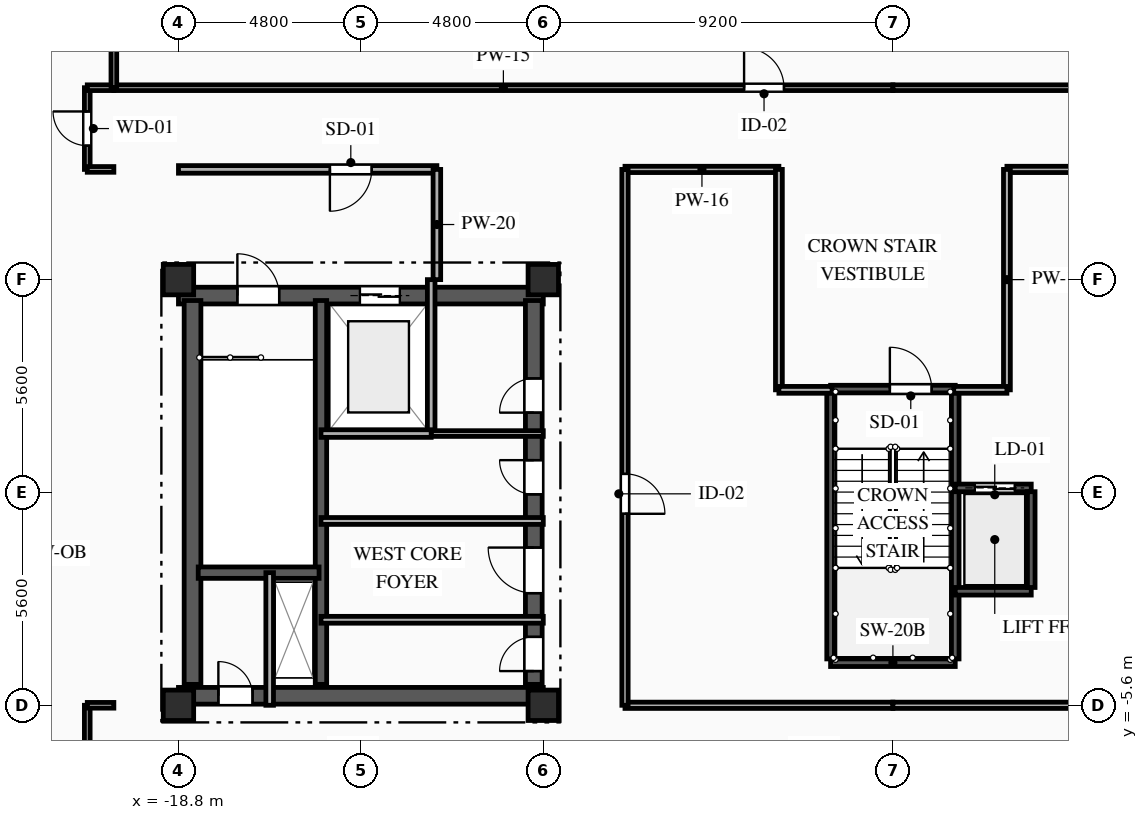
"""IFC4 building model, lengths in metres.
Left out: names, types, materials, properties, quantities, classifications, styles, units other than length and angle.
Written with IfcOpenShell. Run it as: python <this file> out.ifc"""

import sys

from ifc_helpers import new_model, si_unit, direction, frame, frame_2d, origin, origin_2d, place, context, subcontext, project, spatial, rectangle, extrude, element, fill, save


model = new_model("IFC4")
c1 = context("Model", 3, precision=1e-05, world=origin(), true_north=direction((0.0, 1.0)))
c2 = subcontext(c1, "Body", "Model", "MODEL_VIEW")
j1 = project(units=[si_unit("LENGTHUNIT", "METRE"), si_unit("PLANEANGLEUNIT", "RADIAN")], contexts=[c1])
p1 = place(None, origin())
s1 = spatial("IfcSite", under=j1, at=p1, CompositionType="ELEMENT")
p2 = place(p1, origin())
s2 = spatial("IfcBuilding", under=s1, at=p2, CompositionType="ELEMENT")
p3 = place(p2, frame((0.0, 0.0, 266.0)))
s3 = spatial("IfcBuildingStorey", under=s2, at=p3, CompositionType="ELEMENT", Elevation=266.0)
for number, where, z_axis, x_axis in (
    (1, (-18.8, -5.6, 0.0), (0.0, 0.0, 1.0), (1.0, 0.0, 0.0)),
    (2, (-18.8, 5.6, 0.0), (0.0, 0.0, 1.0), (1.0, 0.0, 0.0)),
    (3, (-9.2, -5.6, 0.0), (0.0, 0.0, 1.0), (1.0, 0.0, 0.0)),
    (4, (-9.2, 5.6, 0.0), (0.0, 0.0, 1.0), (1.0, 0.0, 0.0)),
):
    element("IfcColumn", number, at=place(p3, frame(where, z_axis=z_axis, x_axis=x_axis)), inside=s3, PredefinedType="COLUMN", context=c2, shape_type="SweptSolid", body=[
        extrude(rectangle(XDim=0.8, YDim=0.8, at=origin_2d()), origin(), (0.0, 0.0, 1.0), 4.2),
    ])
p4 = place(p3, frame((-18.8, 5.18, 0.0), z_axis=(0.0, 0.0, 1.0), x_axis=(1.0, 0.0, 0.0)))
e5 = element("IfcWall", 5, at=p4, inside=s3, PredefinedType="SHEAR", context=c2, shape_type="SweptSolid", body=[
    extrude(rectangle(XDim=9.6, YDim=0.44, at=frame_2d((4.8, 0.0))), origin(), (0.0, 0.0, 1.0), 3.8),
])
p5 = place(p4, frame((1.55, 0.0, 0.0)))
e6 = element("IfcOpeningElement", 6, at=p5, cuts=e5, PredefinedType="OPENING", context=c2, shape_type="SweptSolid", body=[
    extrude(rectangle(XDim=1.1, YDim=2.15, at=frame_2d((0.55, 1.075))), frame((0.0, 0.23, 0.0), z_axis=(0.0, -1.0, 0.0), x_axis=(1.0, 0.0, 0.0)), (0.0, 0.0, 1.0), 0.46),
])
p6 = place(p4, frame((4.775, 0.0, 0.0)))
e7 = element("IfcOpeningElement", 7, at=p6, cuts=e5, PredefinedType="OPENING", context=c2, shape_type="SweptSolid", body=[
    extrude(rectangle(XDim=1.05, YDim=2.1, at=frame_2d((0.525, 1.05))), frame((0.0, 0.23, 0.0), z_axis=(0.0, -1.0, 0.0), x_axis=(1.0, 0.0, 0.0)), (0.0, 0.0, 1.0), 0.46),
])
p7 = place(p3, frame((-18.8, -5.35, 0.0), z_axis=(0.0, 0.0, 1.0), x_axis=(1.0, 0.0, 0.0)))
e8 = element("IfcWall", 8, at=p7, inside=s3, PredefinedType="SHEAR", context=c2, shape_type="SweptSolid", body=[
    extrude(rectangle(XDim=9.6, YDim=0.44, at=frame_2d((4.8, 0.0))), origin(), (0.0, 0.0, 1.0), 3.8),
])
p8 = place(p7, frame((1.05, 0.0, 0.0)))
e9 = element("IfcOpeningElement", 9, at=p8, cuts=e8, PredefinedType="OPENING", context=c2, shape_type="SweptSolid", body=[
    extrude(rectangle(XDim=0.9, YDim=2.1, at=frame_2d((0.45, 1.05))), frame((0.0, 0.23, 0.0), z_axis=(0.0, -1.0, 0.0), x_axis=(1.0, 0.0, 0.0)), (0.0, 0.0, 1.0), 0.46),
])
p9 = place(p3, frame((-18.43, -5.05, 0.0), z_axis=(0.0, 0.0, 1.0), x_axis=(0.0, 1.0, 0.0)))
e10 = element("IfcWall", 10, at=p9, inside=s3, PredefinedType="SHEAR", context=c2, shape_type="SweptSolid", body=[
    extrude(rectangle(XDim=10.1, YDim=0.44, at=frame_2d((5.05, 0.0))), origin(), (0.0, 0.0, 1.0), 3.8),
])
p10 = place(p3, frame((-9.45, -5.05, 0.0), z_axis=(0.0, 0.0, 1.0), x_axis=(0.0, 1.0, 0.0)))
e11 = element("IfcWall", 11, at=p10, inside=s3, PredefinedType="SHEAR", context=c2, shape_type="SweptSolid", body=[
    extrude(rectangle(XDim=10.1, YDim=0.44, at=frame_2d((5.05, 0.0))), origin(), (0.0, 0.0, 1.0), 3.8),
])
p11 = place(p10, frame((7.15, 0.0, 0.0)))
e12 = element("IfcOpeningElement", 12, at=p11, cuts=e11, PredefinedType="OPENING", context=c2, shape_type="SweptSolid", body=[
    extrude(rectangle(XDim=0.9, YDim=2.1, at=frame_2d((0.45, 1.05))), frame((0.0, 0.23, 0.0), z_axis=(0.0, -1.0, 0.0), x_axis=(1.0, 0.0, 0.0)), (0.0, 0.0, 1.0), 0.46),
])
p12 = place(p10, frame((2.4, 0.0, 0.0)))
e13 = element("IfcOpeningElement", 13, at=p12, cuts=e11, PredefinedType="OPENING", context=c2, shape_type="SweptSolid", body=[
    extrude(rectangle(XDim=1.2, YDim=2.15, at=frame_2d((0.6, 1.075))), frame((0.0, 0.23, 0.0), z_axis=(0.0, -1.0, 0.0), x_axis=(1.0, 0.0, 0.0)), (0.0, 0.0, 1.0), 0.46),
])
p13 = place(p10, frame((0.35, 0.0, 0.0)))
e14 = element("IfcOpeningElement", 14, at=p13, cuts=e11, PredefinedType="OPENING", context=c2, shape_type="SweptSolid", body=[
    extrude(rectangle(XDim=0.9, YDim=2.1, at=frame_2d((0.45, 1.05))), frame((0.0, 0.23, 0.0), z_axis=(0.0, -1.0, 0.0), x_axis=(1.0, 0.0, 0.0)), (0.0, 0.0, 1.0), 0.46),
])
p14 = place(p10, frame((5.0, 0.0, 0.0)))
e15 = element("IfcOpeningElement", 15, at=p14, cuts=e11, PredefinedType="OPENING", context=c2, shape_type="SweptSolid", body=[
    extrude(rectangle(XDim=0.9, YDim=2.1, at=frame_2d((0.45, 1.05))), frame((0.0, 0.23, 0.0), z_axis=(0.0, -1.0, 0.0), x_axis=(1.0, 0.0, 0.0)), (0.0, 0.0, 1.0), 0.46),
])
p15 = place(p3, frame((-15.05, -5.05, 0.0), z_axis=(0.0, 0.0, 1.0), x_axis=(0.0, 1.0, 0.0)))
e16 = element("IfcWall", 16, at=p15, inside=s3, PredefinedType="SHEAR", context=c2, shape_type="SweptSolid", body=[
    extrude(rectangle(XDim=10.1, YDim=0.3, at=frame_2d((5.05, 0.0))), origin(), (0.0, 0.0, 1.0), 3.8),
])
p16 = place(p3, frame((-18.28, -2.11, 0.0), z_axis=(0.0, 0.0, 1.0), x_axis=(1.0, 0.0, 0.0)))
e17 = element("IfcWall", 17, at=p16, inside=s3, PredefinedType="SHEAR", context=c2, shape_type="SweptSolid", body=[
    extrude(rectangle(XDim=3.18, YDim=0.3, at=frame_2d((1.59, 0.0))), origin(), (0.0, 0.0, 1.0), 3.8),
])
p17 = place(p3, frame((-1.64, 2.72, 0.0), z_axis=(0.0, 0.0, 1.0), x_axis=(1.0, 0.0, 0.0)))
e18 = element("IfcWall", 18, at=p17, inside=s3, PredefinedType="SHEAR", context=c2, shape_type="SweptSolid", body=[
    extrude(rectangle(XDim=3.28, YDim=0.2, at=frame_2d((1.64, 0.0))), origin(), (0.0, 0.0, 1.0), 3.8),
])
p18 = place(p17, frame((1.56, 0.0, 0.0)))
e19 = element("IfcOpeningElement", 19, at=p18, cuts=e18, PredefinedType="OPENING", context=c2, shape_type="SweptSolid", body=[
    extrude(rectangle(XDim=1.1, YDim=2.15, at=frame_2d((0.55, 1.075))), frame((0.0, 0.11, 0.0), z_axis=(0.0, -1.0, 0.0), x_axis=(1.0, 0.0, 0.0)), (0.0, 0.0, 1.0), 0.22),
])
p19 = place(p3, frame((-1.64, -4.48, 0.0), z_axis=(0.0, 0.0, 1.0), x_axis=(1.0, 0.0, 0.0)))
e20 = element("IfcWall", 20, at=p19, inside=s3, PredefinedType="SHEAR", context=c2, shape_type="SweptSolid", body=[
    extrude(rectangle(XDim=3.28, YDim=0.2, at=frame_2d((1.64, 0.0))), origin(), (0.0, 0.0, 1.0), 3.8),
])
for number, where, z_axis, x_axis in (
    (21, (-1.64, -4.38, 0.0), (0.0, 0.0, 1.0), (0.0, 1.0, 0.0)),
    (22, (1.64, -4.38, 0.0), (0.0, 0.0, 1.0), (0.0, 1.0, 0.0)),
):
    element("IfcWall", number, at=place(p3, frame(where, z_axis=z_axis, x_axis=x_axis)), inside=s3, PredefinedType="SHEAR", context=c2, shape_type="SweptSolid", body=[
        extrude(rectangle(XDim=7.0, YDim=0.2, at=frame_2d((3.5, 0.0))), origin(), (0.0, 0.0, 1.0), 3.8),
    ])
p20 = place(p3, frame((1.64, 0.12, 0.0), z_axis=(0.0, 0.0, 1.0), x_axis=(1.0, 0.0, 0.0)))
e23 = element("IfcWall", 23, at=p20, inside=s3, PredefinedType="SHEAR", context=c2, shape_type="SweptSolid", body=[
    extrude(rectangle(XDim=2.0, YDim=0.2, at=frame_2d((1.0, 0.0))), origin(), (0.0, 0.0, 1.0), 3.8),
])
p21 = place(p20, frame((0.515, 0.0, 0.0)))
e24 = element("IfcOpeningElement", 24, at=p21, cuts=e23, PredefinedType="OPENING", context=c2, shape_type="SweptSolid", body=[
    extrude(rectangle(XDim=1.05, YDim=2.1, at=frame_2d((0.525, 1.05))), frame((0.0, 0.11, 0.0), z_axis=(0.0, -1.0, 0.0), x_axis=(1.0, 0.0, 0.0)), (0.0, 0.0, 1.0), 0.22),
])
p22 = place(p3, frame((1.64, -2.6, 0.0), z_axis=(0.0, 0.0, 1.0), x_axis=(1.0, 0.0, 0.0)))
e25 = element("IfcWall", 25, at=p22, inside=s3, PredefinedType="SHEAR", context=c2, shape_type="SweptSolid", body=[
    extrude(rectangle(XDim=2.0, YDim=0.2, at=frame_2d((1.0, 0.0))), origin(), (0.0, 0.0, 1.0), 3.8),
])
p23 = place(p3, frame((3.64, -2.5, 0.0), z_axis=(0.0, 0.0, 1.0), x_axis=(0.0, 1.0, 0.0)))
e26 = element("IfcWall", 26, at=p23, inside=s3, PredefinedType="SHEAR", context=c2, shape_type="SweptSolid", body=[
    extrude(rectangle(XDim=2.52, YDim=0.2, at=frame_2d((1.26, 0.0))), origin(), (0.0, 0.0, 1.0), 3.8),
])
p24 = place(p3, frame((-16.4, -5.6, 0.0), z_axis=(0.0, 0.0, 1.0), x_axis=(0.0, 1.0, 0.0)))
e27 = element("IfcWall", 27, at=p24, inside=s3, PredefinedType="PARTITIONING", context=c2, shape_type="SweptSolid", body=[
    extrude(rectangle(XDim=3.49, YDim=0.2, at=frame_2d((1.745, 0.0))), origin(), (0.0, 0.0, 1.0), 3.8),
])
p25 = place(p3, frame((-12.15, 1.55, 0.0), z_axis=(0.0, 0.0, 1.0), x_axis=(0.0, 1.0, 0.0)))
e28 = element("IfcWall", 28, at=p25, inside=s3, PredefinedType="PARTITIONING", context=c2, shape_type="SweptSolid", body=[
    extrude(rectangle(XDim=4.05, YDim=0.2, at=frame_2d((2.025, 0.0))), origin(), (0.0, 0.0, 1.0), 3.8),
])
p26 = place(p3, frame((-12.0, 8.5, 0.0), z_axis=(0.0, 0.0, 1.0), x_axis=(-1.0, 0.0, 0.0)))
e29 = element("IfcWall", 29, at=p26, inside=s3, PredefinedType="PARTITIONING", context=c2, shape_type="SweptSolid", body=[
    extrude(rectangle(XDim=6.8, YDim=0.2, at=frame_2d((3.4, 0.0))), origin(), (0.0, 0.0, 1.0), 3.8),
])
p27 = place(p26, frame((1.715, 0.0, 0.0)))
e30 = element("IfcOpeningElement", 30, at=p27, cuts=e29, PredefinedType="OPENING", context=c2, shape_type="SweptSolid", body=[
    extrude(rectangle(XDim=1.1, YDim=2.15, at=frame_2d((0.55, 1.075))), frame((0.0, 0.11, 0.0), z_axis=(0.0, -1.0, 0.0), x_axis=(1.0, 0.0, 0.0)), (0.0, 0.0, 1.0), 0.22),
])
p28 = place(p3, frame((-12.0, 5.6, 0.0), z_axis=(0.0, 0.0, 1.0), x_axis=(0.0, 1.0, 0.0)))
e31 = element("IfcWall", 31, at=p28, inside=s3, PredefinedType="PARTITIONING", context=c2, shape_type="SweptSolid", body=[
    extrude(rectangle(XDim=2.9, YDim=0.2, at=frame_2d((1.45, 0.0))), origin(), (0.0, 0.0, 1.0), 3.8),
])
p29 = place(p3, frame((-12.15, 1.55, 0.0), z_axis=(0.0, 0.0, 1.0), x_axis=(1.0, 0.0, 0.0)))
e32 = element("IfcWall", 32, at=p29, inside=s3, PredefinedType="PARTITIONING", context=c2, shape_type="SweptSolid", body=[
    extrude(rectangle(XDim=2.95, YDim=0.15, at=frame_2d((1.475, 0.0))), origin(), (0.0, 0.0, 1.0), 3.8),
])
for number, where, z_axis, x_axis in (
    (33, (-15.05, -3.35, 0.0), (0.0, 0.0, 1.0), (1.0, 0.0, 0.0)),
    (34, (-9.2, -0.75, 0.0), (0.0, 0.0, 1.0), (-1.0, 0.0, 0.0)),
):
    element("IfcWall", number, at=place(p3, frame(where, z_axis=z_axis, x_axis=x_axis)), inside=s3, PredefinedType="PARTITIONING", context=c2, shape_type="SweptSolid", body=[
        extrude(rectangle(XDim=5.85, YDim=0.18, at=frame_2d((2.925, 0.0))), origin(), (0.0, 0.0, 1.0), 3.8),
    ])
p30 = place(p3, frame((-3.0, 8.5, 0.0), z_axis=(0.0, 0.0, 1.0), x_axis=(-1.0, 0.0, 0.0)))
e35 = element("IfcWall", 35, at=p30, inside=s3, PredefinedType="PARTITIONING", context=c2, shape_type="SweptSolid", body=[
    extrude(rectangle(XDim=4.05, YDim=0.165, at=frame_2d((2.025, 0.0))), origin(), (0.0, 0.0, 1.0), 3.8),
])
p31 = place(p3, frame((-21.2, 8.5, 0.0), z_axis=(0.0, 0.0, 1.0), x_axis=(0.0, 1.0, 0.0)))
e36 = element("IfcWall", 36, at=p31, inside=s3, PredefinedType="PARTITIONING", context=c2, shape_type="SweptSolid", body=[
    extrude(rectangle(XDim=2.15, YDim=0.15, at=frame_2d((1.075, 0.0))), origin(), (0.0, 0.0, 1.0), 3.455),
])
p32 = place(p31, frame((0.625, 0.0, 0.0)))
e37 = element("IfcOpeningElement", 37, at=p32, cuts=e36, PredefinedType="OPENING", context=c2, shape_type="SweptSolid", body=[
    extrude(rectangle(XDim=0.9, YDim=2.1, at=frame_2d((0.45, 1.05))), frame((0.0, 0.085, 0.0), z_axis=(0.0, -1.0, 0.0), x_axis=(1.0, 0.0, 0.0)), (0.0, 0.0, 1.0), 0.17),
])
for number, where, z_axis, x_axis in (
    (38, (-20.5, 8.5, 0.0), (0.0, 0.0, 1.0), (-1.0, 0.0, 0.0)),
    (39, (-21.2, 10.65, 0.0), (0.0, 0.0, 1.0), (1.0, 0.0, 0.0)),
):
    element("IfcWall", number, at=place(p3, frame(where, z_axis=z_axis, x_axis=x_axis)), inside=s3, PredefinedType="PARTITIONING", context=c2, shape_type="SweptSolid", body=[
        extrude(rectangle(XDim=0.7, YDim=0.15, at=frame_2d((0.35, 0.0))), origin(), (0.0, 0.0, 1.0), 3.8),
    ])
p33 = place(p3, frame((-20.5, 10.65, 0.0), z_axis=(0.0, 0.0, 1.0), x_axis=(1.0, 0.0, 0.0)))
e40 = element("IfcWall", 40, at=p33, inside=s3, PredefinedType="PARTITIONING", context=c2, shape_type="SweptSolid", body=[
    extrude(rectangle(XDim=20.5, YDim=0.15, at=frame_2d((10.25, 0.0))), origin(), (0.0, 0.0, 1.0), 3.8),
])
p34 = place(p33, frame((16.584, 0.0, 0.0)))
e41 = element("IfcOpeningElement", 41, at=p34, cuts=e40, PredefinedType="OPENING", context=c2, shape_type="SweptSolid", body=[
    extrude(rectangle(XDim=1.05, YDim=2.15, at=frame_2d((0.525, 1.075))), frame((0.0, 0.085, 0.0), z_axis=(0.0, -1.0, 0.0), x_axis=(1.0, 0.0, 0.0)), (0.0, 0.0, 1.0), 0.17),
])
p35 = place(p3, frame((7.05, 8.5, 0.0), z_axis=(0.0, 0.0, 1.0), x_axis=(-1.0, 0.0, 0.0)))
e42 = element("IfcWall", 42, at=p35, inside=s3, PredefinedType="PARTITIONING", context=c2, shape_type="SweptSolid", body=[
    extrude(rectangle(XDim=4.05, YDim=0.165, at=frame_2d((2.025, 0.0))), origin(), (0.0, 0.0, 1.0), 3.8),
])
p36 = place(p3, frame((0.0, 10.65, 0.0), z_axis=(0.0, 0.0, 1.0), x_axis=(1.0, 0.0, 0.0)))
e43 = element("IfcWall", 43, at=p36, inside=s3, PredefinedType="PARTITIONING", context=c2, shape_type="SweptSolid", body=[
    extrude(rectangle(XDim=8.0, YDim=0.15, at=frame_2d((4.0, 0.0))), origin(), (0.0, 0.0, 1.0), 3.8),
])
p37 = place(p3, frame((-7.05, -5.6, 0.0), z_axis=(0.0, 0.0, 1.0), x_axis=(1.0, 0.0, 0.0)))
e44 = element("IfcWall", 44, at=p37, inside=s3, PredefinedType="PARTITIONING", context=c2, shape_type="SweptSolid", body=[
    extrude(rectangle(XDim=7.05, YDim=0.165, at=frame_2d((3.525, 0.0))), origin(), (0.0, 0.0, 1.0), 3.285),
])
p38 = place(p3, frame((-21.2, -7.75, 0.0), z_axis=(0.0, 0.0, 1.0), x_axis=(0.0, 1.0, 0.0)))
e45 = element("IfcWall", 45, at=p38, inside=s3, PredefinedType="PARTITIONING", context=c2, shape_type="SweptSolid", body=[
    extrude(rectangle(XDim=2.15, YDim=0.15, at=frame_2d((1.075, 0.0))), origin(), (0.0, 0.0, 1.0), 3.455),
])
p39 = place(p3, frame((-21.2, -5.6, 0.0), z_axis=(0.0, 0.0, 1.0), x_axis=(1.0, 0.0, 0.0)))
e46 = element("IfcWall", 46, at=p39, inside=s3, PredefinedType="PARTITIONING", context=c2, shape_type="SweptSolid", body=[
    extrude(rectangle(XDim=0.7, YDim=0.15, at=frame_2d((0.35, 0.0))), origin(), (0.0, 0.0, 1.0), 3.8),
])
p40 = place(p3, frame((0.0, -5.6, 0.0), z_axis=(0.0, 0.0, 1.0), x_axis=(1.0, 0.0, 0.0)))
e47 = element("IfcWall", 47, at=p40, inside=s3, PredefinedType="PARTITIONING", context=c2, shape_type="SweptSolid", body=[
    extrude(rectangle(XDim=7.05, YDim=0.165, at=frame_2d((3.525, 0.0))), origin(), (0.0, 0.0, 1.0), 3.285),
])
p41 = place(p3, frame((-7.05, 8.5, 0.0), z_axis=(0.0, 0.0, 1.0), x_axis=(0.0, -1.0, 0.0)))
e48 = element("IfcWall", 48, at=p41, inside=s3, PredefinedType="PARTITIONING", context=c2, shape_type="SweptSolid", body=[
    extrude(rectangle(XDim=14.1, YDim=0.165, at=frame_2d((7.05, 0.0))), origin(), (0.0, 0.0, 1.0), 3.8),
])
p42 = place(p41, frame((8.011, 0.0, 0.0)))
e49 = element("IfcOpeningElement", 49, at=p42, cuts=e48, PredefinedType="OPENING", context=c2, shape_type="SweptSolid", body=[
    extrude(rectangle(XDim=1.05, YDim=2.15, at=frame_2d((0.525, 1.075))), frame((0.0, 0.093, 0.0), z_axis=(0.0, -1.0, 0.0), x_axis=(1.0, 0.0, 0.0)), (0.0, 0.0, 1.0), 0.185),
])
for number, where, z_axis, x_axis in (
    (50, (3.0, 8.5, 0.0), (0.0, 0.0, 1.0), (0.0, -1.0, 0.0)),
    (51, (-3.0, 2.7, 0.0), (0.0, 0.0, 1.0), (0.0, 1.0, 0.0)),
):
    element("IfcWall", number, at=place(p3, frame(where, z_axis=z_axis, x_axis=x_axis)), inside=s3, PredefinedType="PARTITIONING", context=c2, shape_type="SweptSolid", body=[
        extrude(rectangle(XDim=5.8, YDim=0.18, at=frame_2d((2.9, 0.0))), origin(), (0.0, 0.0, 1.0), 3.8),
    ])
for number, where, z_axis, x_axis in (
    (52, (3.0, 2.7, 0.0), (0.0, 0.0, 1.0), (-1.0, 0.0, 0.0)),
    (53, (-1.6, 2.7, 0.0), (0.0, 0.0, 1.0), (-1.0, 0.0, 0.0)),
):
    element("IfcWall", number, at=place(p3, frame(where, z_axis=z_axis, x_axis=x_axis)), inside=s3, PredefinedType="PARTITIONING", context=c2, shape_type="SweptSolid", body=[
        extrude(rectangle(XDim=1.4, YDim=0.18, at=frame_2d((0.7, 0.0))), origin(), (0.0, 0.0, 1.0), 3.8),
    ])
p43 = place(p3, frame((-20.5, 15.2, 0.0), z_axis=(0.0, 0.0, 1.0), x_axis=(0.0, -1.0, 0.0)))
e54 = element("IfcWall", 54, at=p43, inside=s3, PredefinedType="PARTITIONING", context=c2, shape_type="SweptSolid", body=[
    extrude(rectangle(XDim=4.55, YDim=0.15, at=frame_2d((2.275, 0.0))), origin(), (0.0, 0.0, 1.0), 3.425),
])
p44 = place(p3, frame((-15.05, 1.55, 0.0), z_axis=(0.0, 0.0, 1.0), x_axis=(1.0, 0.0, 0.0)))
e55 = element("IfcWall", 55, at=p44, inside=s3, PredefinedType="PARTITIONING", context=c2, shape_type="SweptSolid", body=[
    extrude(rectangle(XDim=2.9, YDim=0.2, at=frame_2d((1.45, 0.0))), origin(), (0.0, 0.0, 1.0), 3.8),
])
p45 = place(p5, origin())
e56 = element("IfcDoor", 56, at=p45, inside=s3, OperationType="SINGLE_SWING_LEFT", PredefinedType="DOOR", context=c2, shape_type="SweptSolid", body=[
    extrude(rectangle(XDim=1.1, YDim=2.15, at=frame_2d((0.55, 1.075))), frame((0.0, 0.025, 0.0), z_axis=(0.0, -1.0, 0.0), x_axis=(1.0, 0.0, 0.0)), (0.0, 0.0, 1.0), 0.05),
])
fill(e6, e56)
p46 = place(p6, origin())
e57 = element("IfcDoor", 57, at=p46, inside=s3, OperationType="DOUBLE_DOOR_SLIDING", PredefinedType="DOOR", context=c2, shape_type="SweptSolid", body=[
    extrude(rectangle(XDim=1.05, YDim=2.1, at=frame_2d((0.525, 1.05))), frame((0.0, 0.025, 0.0), z_axis=(0.0, -1.0, 0.0), x_axis=(1.0, 0.0, 0.0)), (0.0, 0.0, 1.0), 0.05),
])
fill(e7, e57)
p47 = place(p8, origin())
e58 = element("IfcDoor", 58, at=p47, inside=s3, OperationType="SINGLE_SWING_LEFT", PredefinedType="DOOR", context=c2, shape_type="SweptSolid", body=[
    extrude(rectangle(XDim=0.9, YDim=2.1, at=frame_2d((0.45, 1.05))), frame((0.0, 0.025, 0.0), z_axis=(0.0, -1.0, 0.0), x_axis=(1.0, 0.0, 0.0)), (0.0, 0.0, 1.0), 0.05),
])
fill(e9, e58)
p48 = place(p18, origin())
e59 = element("IfcDoor", 59, at=p48, inside=s3, OperationType="SINGLE_SWING_LEFT", PredefinedType="DOOR", context=c2, shape_type="SweptSolid", body=[
    extrude(rectangle(XDim=1.1, YDim=2.15, at=frame_2d((0.55, 1.075))), frame((0.0, 0.025, 0.0), z_axis=(0.0, -1.0, 0.0), x_axis=(1.0, 0.0, 0.0)), (0.0, 0.0, 1.0), 0.05),
])
fill(e19, e59)
p49 = place(p21, origin())
e60 = element("IfcDoor", 60, at=p49, inside=s3, OperationType="DOUBLE_DOOR_SLIDING", PredefinedType="DOOR", context=c2, shape_type="SweptSolid", body=[
    extrude(rectangle(XDim=1.05, YDim=2.1, at=frame_2d((0.525, 1.05))), frame((0.0, 0.025, 0.0), z_axis=(0.0, -1.0, 0.0), x_axis=(1.0, 0.0, 0.0)), (0.0, 0.0, 1.0), 0.05),
])
fill(e24, e60)
p50 = place(p27, origin())
e61 = element("IfcDoor", 61, at=p50, inside=s3, OperationType="SINGLE_SWING_RIGHT", PredefinedType="DOOR", context=c2, shape_type="SweptSolid", body=[
    extrude(rectangle(XDim=1.1, YDim=2.15, at=frame_2d((0.55, 1.075))), frame((0.0, 0.025, 0.0), z_axis=(0.0, -1.0, 0.0), x_axis=(1.0, 0.0, 0.0)), (0.0, 0.0, 1.0), 0.05),
])
fill(e30, e61)
p51 = place(p11, origin())
e62 = element("IfcDoor", 62, at=p51, inside=s3, OperationType="SINGLE_SWING_LEFT", PredefinedType="DOOR", context=c2, shape_type="SweptSolid", body=[
    extrude(rectangle(XDim=0.9, YDim=2.1, at=frame_2d((0.45, 1.05))), frame((0.0, 0.025, 0.0), z_axis=(0.0, -1.0, 0.0), x_axis=(1.0, 0.0, 0.0)), (0.0, 0.0, 1.0), 0.05),
])
fill(e12, e62)
p52 = place(p12, origin())
e63 = element("IfcDoor", 63, at=p52, inside=s3, OperationType="SINGLE_SWING_RIGHT", PredefinedType="DOOR", context=c2, shape_type="SweptSolid", body=[
    extrude(rectangle(XDim=1.2, YDim=2.15, at=frame_2d((0.6, 1.075))), frame((0.0, 0.025, 0.0), z_axis=(0.0, -1.0, 0.0), x_axis=(1.0, 0.0, 0.0)), (0.0, 0.0, 1.0), 0.05),
])
fill(e13, e63)
p53 = place(p13, origin())
e64 = element("IfcDoor", 64, at=p53, inside=s3, OperationType="SINGLE_SWING_LEFT", PredefinedType="DOOR", context=c2, shape_type="SweptSolid", body=[
    extrude(rectangle(XDim=0.9, YDim=2.1, at=frame_2d((0.45, 1.05))), frame((0.0, 0.025, 0.0), z_axis=(0.0, -1.0, 0.0), x_axis=(1.0, 0.0, 0.0)), (0.0, 0.0, 1.0), 0.05),
])
fill(e14, e64)
p54 = place(p14, origin())
e65 = element("IfcDoor", 65, at=p54, inside=s3, OperationType="SINGLE_SWING_RIGHT", PredefinedType="DOOR", context=c2, shape_type="SweptSolid", body=[
    extrude(rectangle(XDim=0.9, YDim=2.1, at=frame_2d((0.45, 1.05))), frame((0.0, 0.025, 0.0), z_axis=(0.0, -1.0, 0.0), x_axis=(1.0, 0.0, 0.0)), (0.0, 0.0, 1.0), 0.05),
])
fill(e15, e65)
p55 = place(p32, origin())
e66 = element("IfcDoor", 66, at=p55, inside=s3, OperationType="SINGLE_SWING_RIGHT", PredefinedType="DOOR", context=c2, shape_type="SweptSolid", body=[
    extrude(rectangle(XDim=0.9, YDim=2.1, at=frame_2d((0.45, 1.05))), frame((0.0, 0.025, 0.0), z_axis=(0.0, -1.0, 0.0), x_axis=(1.0, 0.0, 0.0)), (0.0, 0.0, 1.0), 0.05),
])
fill(e37, e66)
p56 = place(p34, origin())
e67 = element("IfcDoor", 67, at=p56, inside=s3, OperationType="SINGLE_SWING_LEFT", PredefinedType="DOOR", context=c2, shape_type="SweptSolid", body=[
    extrude(rectangle(XDim=1.05, YDim=2.15, at=frame_2d((0.525, 1.075))), frame((0.0, 0.025, 0.0), z_axis=(0.0, -1.0, 0.0), x_axis=(1.0, 0.0, 0.0)), (0.0, 0.0, 1.0), 0.05),
])
fill(e41, e67)
p57 = place(p42, origin())
e68 = element("IfcDoor", 68, at=p57, inside=s3, OperationType="SINGLE_SWING_RIGHT", PredefinedType="DOOR", context=c2, shape_type="SweptSolid", body=[
    extrude(rectangle(XDim=1.05, YDim=2.15, at=frame_2d((0.525, 1.075))), frame((0.0, 0.025, 0.0), z_axis=(0.0, -1.0, 0.0), x_axis=(1.0, 0.0, 0.0)), (0.0, 0.0, 1.0), 0.05),
])
fill(e49, e68)
save(model, sys.argv[1])
